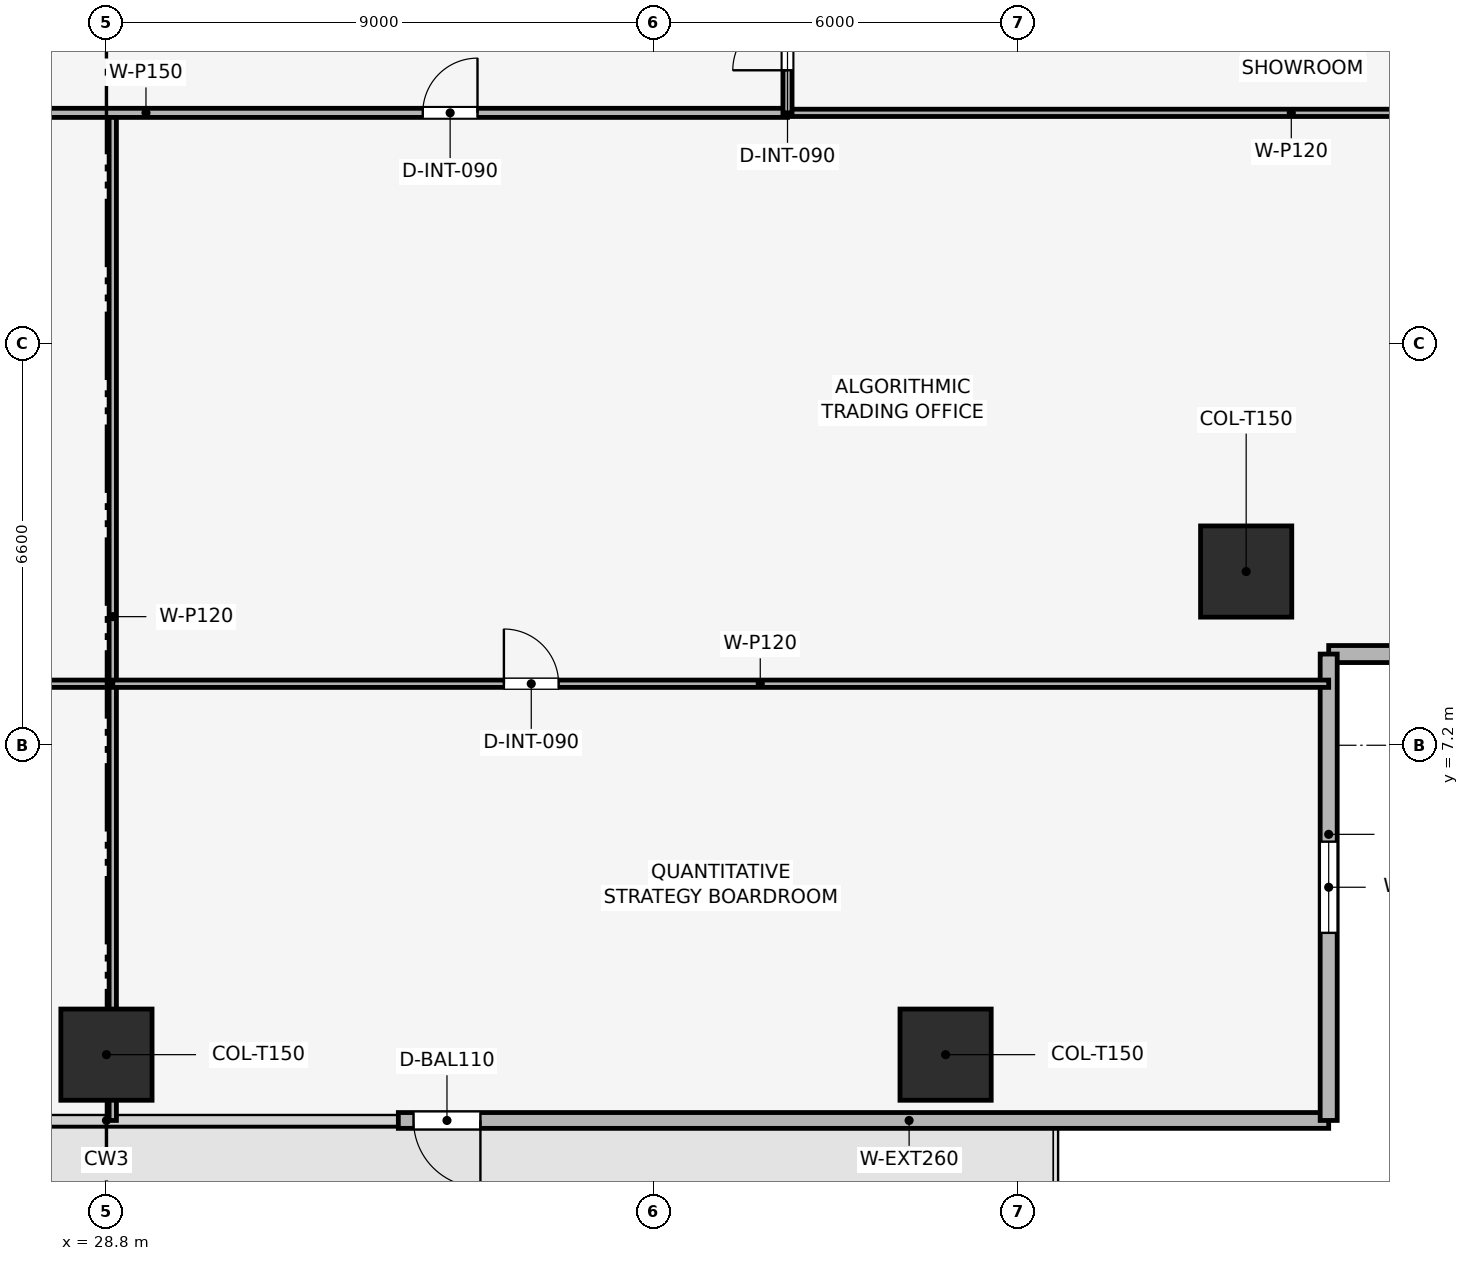
"""IFC4 building model, lengths in metres.
Left out: names, types, materials, properties, quantities, classifications, styles, units other than length and angle.
Written with IfcOpenShell. Run it as: python <this file> out.ifc"""

import sys

from ifc_helpers import new_model, si_unit, direction, frame, frame_2d, origin, origin_2d, place, context, subcontext, project, spatial, rectangle, extrude, element, fill, save


model = new_model("IFC4")
c1 = context("Model", 3, precision=1e-05, world=origin(), true_north=direction((0.0, 1.0)))
c2 = subcontext(c1, "Body", "Model", "MODEL_VIEW")
j1 = project(units=[si_unit("LENGTHUNIT", "METRE"), si_unit("PLANEANGLEUNIT", "RADIAN")], contexts=[c1])
p1 = place(None, origin())
s1 = spatial("IfcSite", under=j1, at=p1, CompositionType="ELEMENT")
p2 = place(p1, origin())
s2 = spatial("IfcBuilding", under=s1, at=p2, CompositionType="ELEMENT")
p3 = place(p2, frame((0.0, 0.0, 104.1)))
s3 = spatial("IfcBuildingStorey", under=s2, at=p3, CompositionType="ELEMENT", Elevation=104.1)
for number, where, z_axis, x_axis in (
    (1, (28.8, 2.112, 0.053), (0.0, 0.225, 0.974), (-1.0, 0.0, 0.0)),
    (2, (42.6, 2.112, 0.053), (0.0, 0.225, 0.974), (-1.0, 0.0, 0.0)),
):
    element("IfcColumn", number, at=place(p3, frame(where, z_axis=z_axis, x_axis=x_axis)), inside=s3, PredefinedType="COLUMN", context=c2, shape_type="SweptSolid", body=[
        extrude(rectangle(XDim=1.5, YDim=1.5, at=origin_2d()), origin(), (0.0, 0.0, 1.0), 3.575),
    ])
p4 = place(p3, frame((47.543, 10.057, 0.044), z_axis=(-0.150192217413, 0.150260517648, 0.977171466358), x_axis=(-0.707267505531, -0.706946020301, 0.0)))
e3 = element("IfcColumn", 3, at=p4, inside=s3, PredefinedType="COLUMN", context=c2, shape_type="SweptSolid", body=[
    extrude(rectangle(XDim=1.5, YDim=1.5, at=origin_2d()), origin(), (0.0, 0.0, 1.0), 3.574),
])
p5 = place(p3, frame((48.9, 1.03, 0.0), z_axis=(0.0, 0.0, 1.0), x_axis=(-1.0, 0.0, 0.0)))
e4 = element("IfcWall", 4, at=p5, inside=s3, PredefinedType="SOLIDWALL", context=c2, shape_type="SweptSolid", body=[
    extrude(rectangle(XDim=15.3, YDim=0.26, at=frame_2d((7.65, 0.0))), origin(), (0.0, 0.0, 1.0), 3.54),
])
p6 = place(p5, frame((13.95, 0.0, 0.0)))
e5 = element("IfcOpeningElement", 5, at=p6, cuts=e4, PredefinedType="OPENING", context=c2, shape_type="SweptSolid", body=[
    extrude(rectangle(XDim=1.1, YDim=2.2, at=frame_2d((0.55, 1.1))), frame((0.0, 0.14, 0.0), z_axis=(0.0, -1.0, 0.0), x_axis=(1.0, 0.0, 0.0)), (0.0, 0.0, 1.0), 0.28),
])
p7 = place(p3, frame((56.57, 8.7, 0.0), z_axis=(0.0, 0.0, 1.0), x_axis=(-1.0, 0.0, 0.0)))
e6 = element("IfcWall", 6, at=p7, inside=s3, PredefinedType="SOLIDWALL", context=c2, shape_type="SweptSolid", body=[
    extrude(rectangle(XDim=7.67, YDim=0.28, at=frame_2d((3.835, 0.0))), origin(), (0.0, 0.0, 1.0), 3.54),
])
p8 = place(p7, frame((3.085, 0.0, 0.72)))
e7 = element("IfcOpeningElement", 7, at=p8, cuts=e6, PredefinedType="OPENING", context=c2, shape_type="SweptSolid", body=[
    extrude(rectangle(XDim=1.5, YDim=2.2, at=frame_2d((0.75, 1.1))), frame((0.0, 0.15, 0.0), z_axis=(0.0, -1.0, 0.0), x_axis=(1.0, 0.0, 0.0)), (0.0, 0.0, 1.0), 0.3),
])
p9 = place(p3, frame((48.9, 8.7, 0.0), z_axis=(0.0, 0.0, 1.0), x_axis=(0.0, -1.0, 0.0)))
e8 = element("IfcWall", 8, at=p9, inside=s3, PredefinedType="SOLIDWALL", context=c2, shape_type="SweptSolid", body=[
    extrude(rectangle(XDim=7.67, YDim=0.28, at=frame_2d((3.835, 0.0))), origin(), (0.0, 0.0, 1.0), 3.54),
])
p10 = place(p9, frame((3.085, 0.0, 0.72)))
e9 = element("IfcOpeningElement", 9, at=p10, cuts=e8, PredefinedType="OPENING", context=c2, shape_type="SweptSolid", body=[
    extrude(rectangle(XDim=1.5, YDim=2.2, at=frame_2d((0.75, 1.1))), frame((0.0, 0.15, 0.0), z_axis=(0.0, -1.0, 0.0), x_axis=(1.0, 0.0, 0.0)), (0.0, 0.0, 1.0), 0.3),
])
p11 = place(p3, frame((19.9, 8.212, 0.0), z_axis=(0.0, 0.0, 1.0), x_axis=(1.0, 0.0, 0.0)))
e10 = element("IfcWall", 10, at=p11, inside=s3, PredefinedType="PARTITIONING", context=c2, shape_type="SweptSolid", body=[
    extrude(rectangle(XDim=9.004, YDim=0.12, at=frame_2d((4.502, 0.0))), origin(), (0.0, 0.0, 1.0), 2.975),
])
p12 = place(p11, frame((1.484, 0.0, 0.0)))
e11 = element("IfcOpeningElement", 11, at=p12, cuts=e10, PredefinedType="OPENING", context=c2, shape_type="SweptSolid", body=[
    extrude(rectangle(XDim=0.9, YDim=2.1, at=frame_2d((0.45, 1.05))), frame((0.0, 0.07, 0.0), z_axis=(0.0, -1.0, 0.0), x_axis=(1.0, 0.0, 0.0)), (0.0, 0.0, 1.0), 0.14),
])
p13 = place(p3, frame((28.904, 1.03, 0.0), z_axis=(0.0, 0.0, 1.0), x_axis=(0.0, 1.0, 0.0)))
e12 = element("IfcWall", 12, at=p13, inside=s3, PredefinedType="PARTITIONING", context=c2, shape_type="SweptSolid", body=[
    extrude(rectangle(XDim=16.57, YDim=0.12, at=frame_2d((8.285, 0.0))), origin(), (0.0, 0.0, 1.0), 2.975),
])
p14 = place(p3, frame((28.904, 8.212, 0.0), z_axis=(0.0, 0.0, 1.0), x_axis=(1.0, 0.0, 0.0)))
e13 = element("IfcWall", 13, at=p14, inside=s3, PredefinedType="PARTITIONING", context=c2, shape_type="SweptSolid", body=[
    extrude(rectangle(XDim=19.996, YDim=0.12, at=frame_2d((9.998, 0.0))), origin(), (0.0, 0.0, 1.0), 2.825),
])
p15 = place(p14, frame((6.432, 0.0, 0.0)))
e14 = element("IfcOpeningElement", 14, at=p15, cuts=e13, PredefinedType="OPENING", context=c2, shape_type="SweptSolid", body=[
    extrude(rectangle(XDim=0.9, YDim=2.1, at=frame_2d((0.45, 1.05))), frame((0.0, 0.07, 0.0), z_axis=(0.0, -1.0, 0.0), x_axis=(1.0, 0.0, 0.0)), (0.0, 0.0, 1.0), 0.14),
])
p16 = place(p3, frame((40.0, 17.6, 0.0), z_axis=(0.0, 0.0, 1.0), x_axis=(1.0, 0.0, 0.0)))
e15 = element("IfcWall", 15, at=p16, inside=s3, PredefinedType="PARTITIONING", context=c2, shape_type="SweptSolid", body=[
    extrude(rectangle(XDim=16.57, YDim=0.12, at=frame_2d((8.285, 0.0))), origin(), (0.0, 0.0, 1.0), 2.825),
])
p17 = place(p3, frame((17.6, 17.6, 0.0), z_axis=(0.0, 0.0, 1.0), x_axis=(1.0, 0.0, 0.0)))
e16 = element("IfcWall", 16, at=p17, inside=s3, PredefinedType="PARTITIONING", context=c2, shape_type="SweptSolid", body=[
    extrude(rectangle(XDim=22.4, YDim=0.15, at=frame_2d((11.2, 0.0))), origin(), (0.0, 0.0, 1.0), 2.975),
])
p18 = place(p17, frame((0.7, 0.0, 0.0)))
e17 = element("IfcOpeningElement", 17, at=p18, cuts=e16, PredefinedType="OPENING", context=c2, shape_type="SweptSolid", body=[
    extrude(rectangle(XDim=0.9, YDim=2.1, at=frame_2d((0.45, 1.05))), frame((0.0, 0.085, 0.0), z_axis=(0.0, -1.0, 0.0), x_axis=(1.0, 0.0, 0.0)), (0.0, 0.0, 1.0), 0.17),
])
p19 = place(p17, frame((6.352, 0.0, 0.0)))
e18 = element("IfcOpeningElement", 18, at=p19, cuts=e16, PredefinedType="OPENING", context=c2, shape_type="SweptSolid", body=[
    extrude(rectangle(XDim=0.9, YDim=2.1, at=frame_2d((0.45, 1.05))), frame((0.0, 0.085, 0.0), z_axis=(0.0, -1.0, 0.0), x_axis=(1.0, 0.0, 0.0)), (0.0, 0.0, 1.0), 0.17),
])
p20 = place(p17, frame((16.402, 0.0, 0.0)))
e19 = element("IfcOpeningElement", 19, at=p20, cuts=e16, PredefinedType="OPENING", context=c2, shape_type="SweptSolid", body=[
    extrude(rectangle(XDim=0.9, YDim=2.1, at=frame_2d((0.45, 1.05))), frame((0.0, 0.085, 0.0), z_axis=(0.0, -1.0, 0.0), x_axis=(1.0, 0.0, 0.0)), (0.0, 0.0, 1.0), 0.17),
])
p21 = place(p3, frame((40.0, 17.6, 0.0), z_axis=(0.0, 0.0, 1.0), x_axis=(0.0, 1.0, 0.0)))
e20 = element("IfcWall", 20, at=p21, inside=s3, PredefinedType="PARTITIONING", context=c2, shape_type="SweptSolid", body=[
    extrude(rectangle(XDim=22.4, YDim=0.15, at=frame_2d((11.2, 0.0))), origin(), (0.0, 0.0, 1.0), 2.975),
])
p22 = place(p21, frame((0.7, 0.0, 0.0)))
e21 = element("IfcOpeningElement", 21, at=p22, cuts=e20, PredefinedType="OPENING", context=c2, shape_type="SweptSolid", body=[
    extrude(rectangle(XDim=0.9, YDim=2.1, at=frame_2d((0.45, 1.05))), frame((0.0, 0.085, 0.0), z_axis=(0.0, -1.0, 0.0), x_axis=(1.0, 0.0, 0.0)), (0.0, 0.0, 1.0), 0.17),
])
p23 = place(p21, frame((4.927, 0.0, 0.0)))
e22 = element("IfcOpeningElement", 22, at=p23, cuts=e20, PredefinedType="OPENING", context=c2, shape_type="SweptSolid", body=[
    extrude(rectangle(XDim=0.9, YDim=2.1, at=frame_2d((0.45, 1.05))), frame((0.0, 0.085, 0.0), z_axis=(0.0, -1.0, 0.0), x_axis=(1.0, 0.0, 0.0)), (0.0, 0.0, 1.0), 0.17),
])
p24 = place(p21, frame((10.886, 0.0, 0.0)))
e23 = element("IfcOpeningElement", 23, at=p24, cuts=e20, PredefinedType="OPENING", context=c2, shape_type="SweptSolid", body=[
    extrude(rectangle(XDim=0.9, YDim=2.1, at=frame_2d((0.45, 1.05))), frame((0.0, 0.085, 0.0), z_axis=(0.0, -1.0, 0.0), x_axis=(1.0, 0.0, 0.0)), (0.0, 0.0, 1.0), 0.17),
])
p25 = place(p21, frame((17.859, 0.0, 0.0)))
e24 = element("IfcOpeningElement", 24, at=p25, cuts=e20, PredefinedType="OPENING", context=c2, shape_type="SweptSolid", body=[
    extrude(rectangle(XDim=0.9, YDim=2.1, at=frame_2d((0.45, 1.05))), frame((0.0, 0.085, 0.0), z_axis=(0.0, -1.0, 0.0), x_axis=(1.0, 0.0, 0.0)), (0.0, 0.0, 1.0), 0.17),
])
p26 = place(p6, origin())
e25 = element("IfcDoor", 25, at=p26, inside=s3, OperationType="SINGLE_SWING_LEFT", PredefinedType="DOOR", context=c2, shape_type="SweptSolid", body=[
    extrude(rectangle(XDim=1.1, YDim=2.2, at=frame_2d((0.55, 1.1))), frame((0.0, 0.025, 0.0), z_axis=(0.0, -1.0, 0.0), x_axis=(1.0, 0.0, 0.0)), (0.0, 0.0, 1.0), 0.05),
])
fill(e5, e25)
p27 = place(p10, origin())
e26 = element("IfcWindow", 26, at=p27, inside=s3, PartitioningType="SINGLE_PANEL", PredefinedType="WINDOW", context=c2, shape_type="SweptSolid", body=[
    extrude(rectangle(XDim=1.5, YDim=2.2, at=frame_2d((0.75, 1.1))), frame((0.0, 0.03, 0.0), z_axis=(0.0, -1.0, 0.0), x_axis=(1.0, 0.0, 0.0)), (0.0, 0.0, 1.0), 0.06),
])
fill(e9, e26)
p28 = place(p15, origin())
e27 = element("IfcDoor", 27, at=p28, inside=s3, OperationType="SINGLE_SWING_LEFT", PredefinedType="DOOR", context=c2, shape_type="SweptSolid", body=[
    extrude(rectangle(XDim=0.9, YDim=2.1, at=frame_2d((0.45, 1.05))), frame((0.0, 0.025, 0.0), z_axis=(0.0, -1.0, 0.0), x_axis=(1.0, 0.0, 0.0)), (0.0, 0.0, 1.0), 0.05),
])
fill(e14, e27)
p29 = place(p20, origin())
e28 = element("IfcDoor", 28, at=p29, inside=s3, OperationType="SINGLE_SWING_RIGHT", PredefinedType="DOOR", context=c2, shape_type="SweptSolid", body=[
    extrude(rectangle(XDim=0.9, YDim=2.1, at=frame_2d((0.45, 1.05))), frame((0.0, 0.025, 0.0), z_axis=(0.0, -1.0, 0.0), x_axis=(1.0, 0.0, 0.0)), (0.0, 0.0, 1.0), 0.05),
])
fill(e19, e28)
p30 = place(p22, origin())
e29 = element("IfcDoor", 29, at=p30, inside=s3, OperationType="SINGLE_SWING_LEFT", PredefinedType="DOOR", context=c2, shape_type="SweptSolid", body=[
    extrude(rectangle(XDim=0.9, YDim=2.1, at=frame_2d((0.45, 1.05))), frame((0.0, 0.025, 0.0), z_axis=(0.0, -1.0, 0.0), x_axis=(1.0, 0.0, 0.0)), (0.0, 0.0, 1.0), 0.05),
])
fill(e21, e29)
save(model, sys.argv[1])
